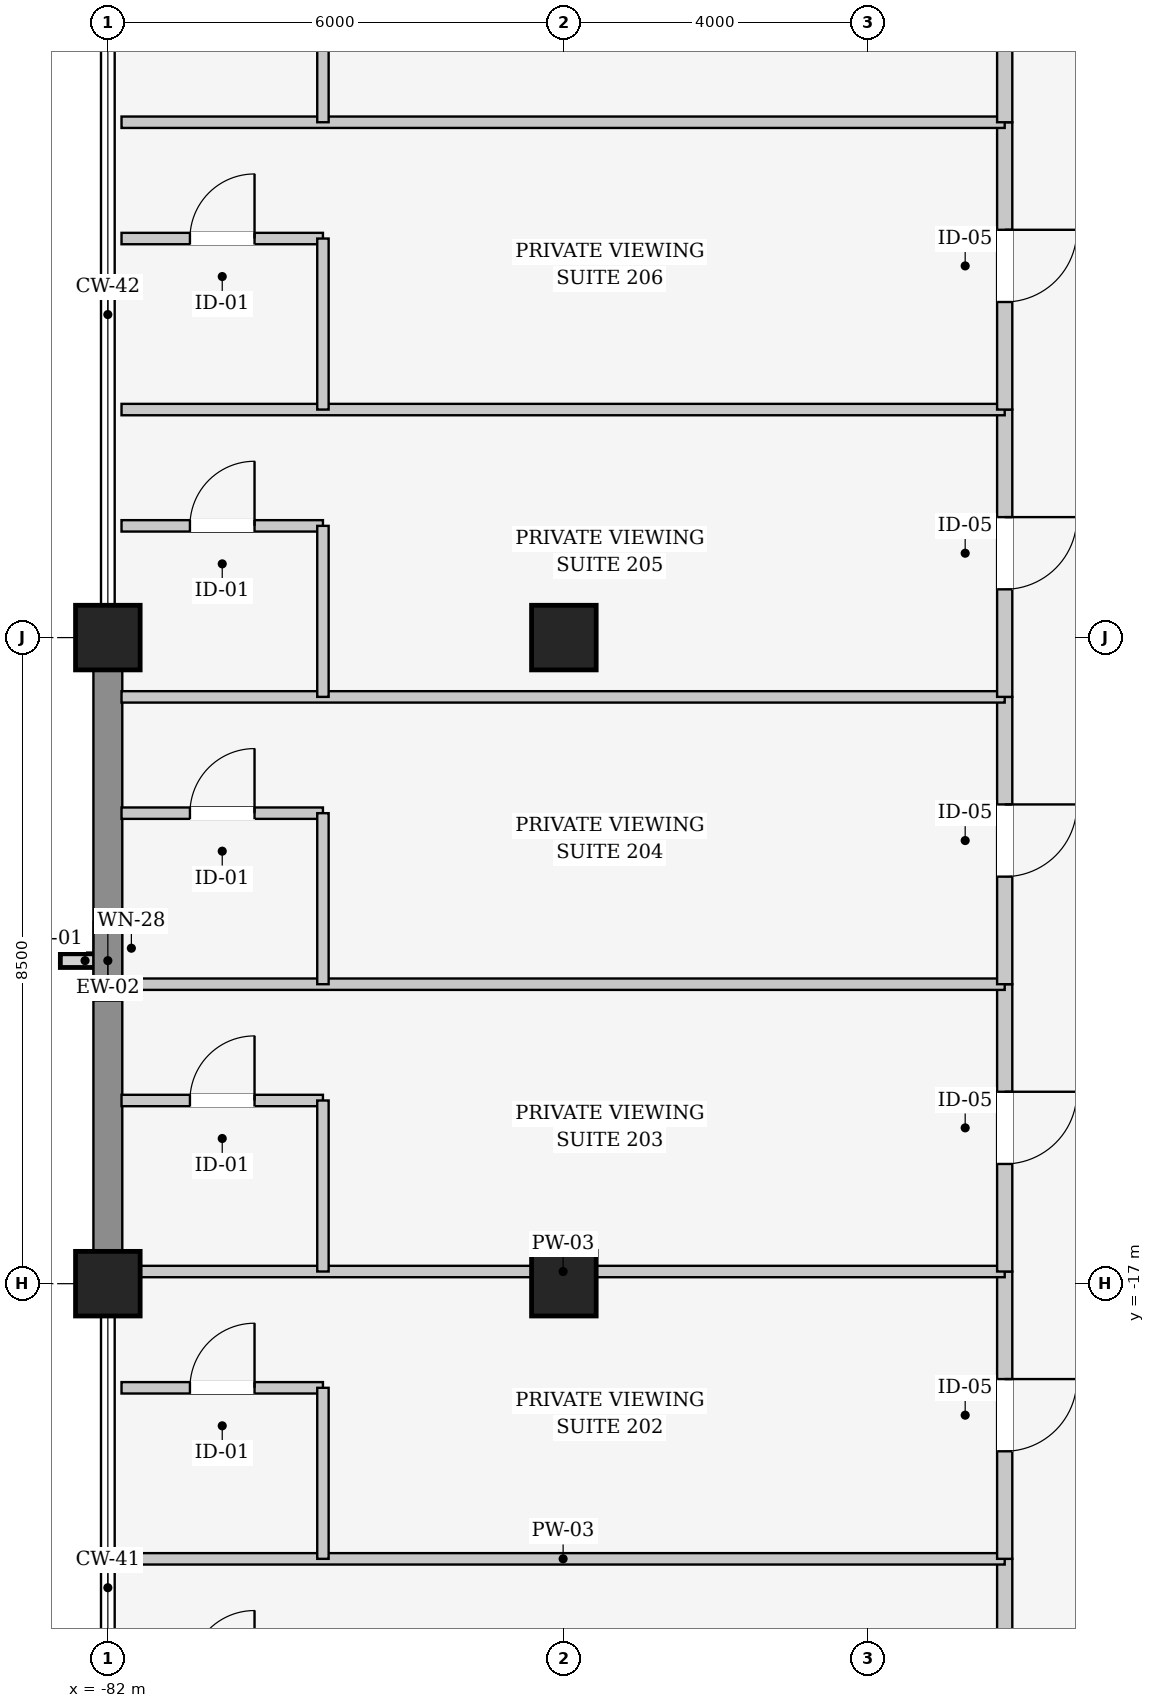
"""IFC4 building model, lengths in metres.
Left out: names, types, materials, properties, quantities, classifications, styles, units other than length and angle.
Written with IfcOpenShell. Run it as: python <this file> out.ifc"""

import sys

from ifc_helpers import new_model, si_unit, direction, frame, frame_2d, origin, origin_2d, place, context, subcontext, project, spatial, rectangle, extrude, element, fill, save


model = new_model("IFC4")
c1 = context("Model", 3, precision=1e-05, world=origin(), true_north=direction((0.0, 1.0)))
c2 = subcontext(c1, "Body", "Model", "MODEL_VIEW")
j1 = project(units=[si_unit("LENGTHUNIT", "METRE"), si_unit("PLANEANGLEUNIT", "RADIAN")], contexts=[c1])
p1 = place(None, origin())
s1 = spatial("IfcSite", under=j1, at=p1, CompositionType="ELEMENT")
p2 = place(p1, origin())
s2 = spatial("IfcBuilding", under=s1, at=p2, CompositionType="ELEMENT")
p3 = place(p2, frame((0.0, 0.0, 11.4)))
s3 = spatial("IfcBuildingStorey", under=s2, at=p3, CompositionType="ELEMENT", Elevation=11.4)
for number, where, z_axis, x_axis in (
    (1, (-82.0, -17.0, 0.0), (0.0, 0.0, 1.0), (1.0, 0.0, 0.0)),
    (2, (-82.0, -8.5, 0.0), (0.0, 0.0, 1.0), (1.0, 0.0, 0.0)),
    (3, (-76.0, -17.0, 0.0), (0.0, 0.0, 1.0), (1.0, 0.0, 0.0)),
    (4, (-76.0, -8.5, 0.0), (0.0, 0.0, 1.0), (1.0, 0.0, 0.0)),
):
    element("IfcColumn", number, at=place(p3, frame(where, z_axis=z_axis, x_axis=x_axis)), inside=s3, PredefinedType="COLUMN", context=c2, shape_type="SweptSolid", body=[
        extrude(rectangle(XDim=0.85, YDim=0.85, at=origin_2d()), origin(), (0.0, 0.0, 1.0), 4.8),
    ])
p4 = place(p3, frame((-82.0, -16.593, 0.0), z_axis=(0.0, 0.0, 1.0), x_axis=(0.0, 1.0, 0.0)))
e5 = element("IfcWall", 5, at=p4, inside=s3, PredefinedType="SOLIDWALL", context=c2, shape_type="SweptSolid", body=[
    extrude(rectangle(XDim=7.686, YDim=0.38, at=frame_2d((3.843, 0.0))), origin(), (0.0, 0.0, 1.0), 3.76),
])
p5 = place(p4, frame((3.318, 0.0, 0.9)))
e6 = element("IfcOpeningElement", 6, at=p5, cuts=e5, PredefinedType="OPENING", context=c2, shape_type="SweptSolid", body=[
    extrude(rectangle(XDim=1.05, YDim=2.0, at=frame_2d((0.525, 1.0))), frame((0.0, 0.2, 0.0), z_axis=(0.0, -1.0, 0.0), x_axis=(1.0, 0.0, 0.0)), (0.0, 0.0, 1.0), 0.4),
])
p6 = place(p3, frame((-70.2, -20.62, 0.0), z_axis=(0.0, 0.0, 1.0), x_axis=(0.0, -1.0, 0.0)))
e7 = element("IfcWall", 7, at=p6, inside=s3, PredefinedType="PARTITIONING", context=c2, shape_type="SweptSolid", body=[
    extrude(rectangle(XDim=3.78, YDim=0.2, at=frame_2d((1.89, 0.0))), origin(), (0.0, 0.0, 1.0), 4.14),
])
p7 = place(p6, frame((1.415, 0.0, 0.0)))
e8 = element("IfcOpeningElement", 8, at=p7, cuts=e7, PredefinedType="OPENING", context=c2, shape_type="SweptSolid", body=[
    extrude(rectangle(XDim=0.95, YDim=2.25, at=frame_2d((0.475, 1.125))), frame((0.0, 0.11, 0.0), z_axis=(0.0, -1.0, 0.0), x_axis=(1.0, 0.0, 0.0)), (0.0, 0.0, 1.0), 0.22),
])
p8 = place(p3, frame((-81.82, -20.62, 0.0), z_axis=(0.0, 0.0, 1.0), x_axis=(1.0, 0.0, 0.0)))
e9 = element("IfcWall", 9, at=p8, inside=s3, PredefinedType="PARTITIONING", context=c2, shape_type="SweptSolid", body=[
    extrude(rectangle(XDim=11.62, YDim=0.15, at=frame_2d((5.81, 0.0))), origin(), (0.0, 0.0, 1.0), 3.845),
])
p9 = place(p3, frame((-81.82, -18.37, 0.0), z_axis=(0.0, 0.0, 1.0), x_axis=(1.0, 0.0, 0.0)))
e10 = element("IfcWall", 10, at=p9, inside=s3, PredefinedType="PARTITIONING", context=c2, shape_type="SweptSolid", body=[
    extrude(rectangle(XDim=2.65, YDim=0.15, at=frame_2d((1.325, 0.0))), origin(), (0.0, 0.0, 1.0), 3.845),
])
p10 = place(p9, frame((0.9, 0.0, 0.0)))
e11 = element("IfcOpeningElement", 11, at=p10, cuts=e10, PredefinedType="OPENING", context=c2, shape_type="SweptSolid", body=[
    extrude(rectangle(XDim=0.85, YDim=2.15, at=frame_2d((0.425, 1.075))), frame((0.0, 0.085, 0.0), z_axis=(0.0, -1.0, 0.0), x_axis=(1.0, 0.0, 0.0)), (0.0, 0.0, 1.0), 0.17),
])
p11 = place(p3, frame((-79.17, -18.37, 0.0), z_axis=(0.0, 0.0, 1.0), x_axis=(0.0, -1.0, 0.0)))
e12 = element("IfcWall", 12, at=p11, inside=s3, PredefinedType="PARTITIONING", context=c2, shape_type="SweptSolid", body=[
    extrude(rectangle(XDim=2.25, YDim=0.15, at=frame_2d((1.125, 0.0))), origin(), (0.0, 0.0, 1.0), 4.44),
])
p12 = place(p3, frame((-70.2, -16.84, 0.0), z_axis=(0.0, 0.0, 1.0), x_axis=(0.0, -1.0, 0.0)))
e13 = element("IfcWall", 13, at=p12, inside=s3, PredefinedType="PARTITIONING", context=c2, shape_type="SweptSolid", body=[
    extrude(rectangle(XDim=3.78, YDim=0.2, at=frame_2d((1.89, 0.0))), origin(), (0.0, 0.0, 1.0), 3.545),
])
p13 = place(p12, frame((1.415, 0.0, 0.0)))
e14 = element("IfcOpeningElement", 14, at=p13, cuts=e13, PredefinedType="OPENING", context=c2, shape_type="SweptSolid", body=[
    extrude(rectangle(XDim=0.95, YDim=2.25, at=frame_2d((0.475, 1.125))), frame((0.0, 0.11, 0.0), z_axis=(0.0, -1.0, 0.0), x_axis=(1.0, 0.0, 0.0)), (0.0, 0.0, 1.0), 0.22),
])
p14 = place(p3, frame((-81.82, -16.84, 0.0), z_axis=(0.0, 0.0, 1.0), x_axis=(1.0, 0.0, 0.0)))
e15 = element("IfcWall", 15, at=p14, inside=s3, PredefinedType="PARTITIONING", context=c2, shape_type="SweptSolid", body=[
    extrude(rectangle(XDim=11.62, YDim=0.15, at=frame_2d((5.81, 0.0))), origin(), (0.0, 0.0, 1.0), 3.545),
])
p15 = place(p3, frame((-81.82, -14.59, 0.0), z_axis=(0.0, 0.0, 1.0), x_axis=(1.0, 0.0, 0.0)))
e16 = element("IfcWall", 16, at=p15, inside=s3, PredefinedType="PARTITIONING", context=c2, shape_type="SweptSolid", body=[
    extrude(rectangle(XDim=2.65, YDim=0.15, at=frame_2d((1.325, 0.0))), origin(), (0.0, 0.0, 1.0), 3.845),
])
p16 = place(p15, frame((0.9, 0.0, 0.0)))
e17 = element("IfcOpeningElement", 17, at=p16, cuts=e16, PredefinedType="OPENING", context=c2, shape_type="SweptSolid", body=[
    extrude(rectangle(XDim=0.85, YDim=2.15, at=frame_2d((0.425, 1.075))), frame((0.0, 0.085, 0.0), z_axis=(0.0, -1.0, 0.0), x_axis=(1.0, 0.0, 0.0)), (0.0, 0.0, 1.0), 0.17),
])
p17 = place(p3, frame((-79.17, -14.59, 0.0), z_axis=(0.0, 0.0, 1.0), x_axis=(0.0, -1.0, 0.0)))
e18 = element("IfcWall", 18, at=p17, inside=s3, PredefinedType="PARTITIONING", context=c2, shape_type="SweptSolid", body=[
    extrude(rectangle(XDim=2.25, YDim=0.15, at=frame_2d((1.125, 0.0))), origin(), (0.0, 0.0, 1.0), 3.745),
])
p18 = place(p3, frame((-70.2, -13.06, 0.0), z_axis=(0.0, 0.0, 1.0), x_axis=(0.0, -1.0, 0.0)))
e19 = element("IfcWall", 19, at=p18, inside=s3, PredefinedType="PARTITIONING", context=c2, shape_type="SweptSolid", body=[
    extrude(rectangle(XDim=3.78, YDim=0.2, at=frame_2d((1.89, 0.0))), origin(), (0.0, 0.0, 1.0), 3.545),
])
p19 = place(p18, frame((1.415, 0.0, 0.0)))
e20 = element("IfcOpeningElement", 20, at=p19, cuts=e19, PredefinedType="OPENING", context=c2, shape_type="SweptSolid", body=[
    extrude(rectangle(XDim=0.95, YDim=2.25, at=frame_2d((0.475, 1.125))), frame((0.0, 0.11, 0.0), z_axis=(0.0, -1.0, 0.0), x_axis=(1.0, 0.0, 0.0)), (0.0, 0.0, 1.0), 0.22),
])
p20 = place(p3, frame((-81.82, -13.06, 0.0), z_axis=(0.0, 0.0, 1.0), x_axis=(1.0, 0.0, 0.0)))
e21 = element("IfcWall", 21, at=p20, inside=s3, PredefinedType="PARTITIONING", context=c2, shape_type="SweptSolid", body=[
    extrude(rectangle(XDim=11.62, YDim=0.15, at=frame_2d((5.81, 0.0))), origin(), (0.0, 0.0, 1.0), 3.845),
])
p21 = place(p3, frame((-81.82, -10.81, 0.0), z_axis=(0.0, 0.0, 1.0), x_axis=(1.0, 0.0, 0.0)))
e22 = element("IfcWall", 22, at=p21, inside=s3, PredefinedType="PARTITIONING", context=c2, shape_type="SweptSolid", body=[
    extrude(rectangle(XDim=2.65, YDim=0.15, at=frame_2d((1.325, 0.0))), origin(), (0.0, 0.0, 1.0), 3.845),
])
p22 = place(p21, frame((0.9, 0.0, 0.0)))
e23 = element("IfcOpeningElement", 23, at=p22, cuts=e22, PredefinedType="OPENING", context=c2, shape_type="SweptSolid", body=[
    extrude(rectangle(XDim=0.85, YDim=2.15, at=frame_2d((0.425, 1.075))), frame((0.0, 0.085, 0.0), z_axis=(0.0, -1.0, 0.0), x_axis=(1.0, 0.0, 0.0)), (0.0, 0.0, 1.0), 0.17),
])
p23 = place(p3, frame((-79.17, -10.81, 0.0), z_axis=(0.0, 0.0, 1.0), x_axis=(0.0, -1.0, 0.0)))
e24 = element("IfcWall", 24, at=p23, inside=s3, PredefinedType="PARTITIONING", context=c2, shape_type="SweptSolid", body=[
    extrude(rectangle(XDim=2.25, YDim=0.15, at=frame_2d((1.125, 0.0))), origin(), (0.0, 0.0, 1.0), 4.14),
])
p24 = place(p3, frame((-70.2, -9.28, 0.0), z_axis=(0.0, 0.0, 1.0), x_axis=(0.0, -1.0, 0.0)))
e25 = element("IfcWall", 25, at=p24, inside=s3, PredefinedType="PARTITIONING", context=c2, shape_type="SweptSolid", body=[
    extrude(rectangle(XDim=3.78, YDim=0.2, at=frame_2d((1.89, 0.0))), origin(), (0.0, 0.0, 1.0), 4.14),
])
p25 = place(p24, frame((1.415, 0.0, 0.0)))
e26 = element("IfcOpeningElement", 26, at=p25, cuts=e25, PredefinedType="OPENING", context=c2, shape_type="SweptSolid", body=[
    extrude(rectangle(XDim=0.95, YDim=2.25, at=frame_2d((0.475, 1.125))), frame((0.0, 0.11, 0.0), z_axis=(0.0, -1.0, 0.0), x_axis=(1.0, 0.0, 0.0)), (0.0, 0.0, 1.0), 0.22),
])
p26 = place(p3, frame((-81.82, -9.28, 0.0), z_axis=(0.0, 0.0, 1.0), x_axis=(1.0, 0.0, 0.0)))
e27 = element("IfcWall", 27, at=p26, inside=s3, PredefinedType="PARTITIONING", context=c2, shape_type="SweptSolid", body=[
    extrude(rectangle(XDim=11.62, YDim=0.15, at=frame_2d((5.81, 0.0))), origin(), (0.0, 0.0, 1.0), 3.845),
])
p27 = place(p3, frame((-81.82, -7.03, 0.0), z_axis=(0.0, 0.0, 1.0), x_axis=(1.0, 0.0, 0.0)))
e28 = element("IfcWall", 28, at=p27, inside=s3, PredefinedType="PARTITIONING", context=c2, shape_type="SweptSolid", body=[
    extrude(rectangle(XDim=2.65, YDim=0.15, at=frame_2d((1.325, 0.0))), origin(), (0.0, 0.0, 1.0), 3.845),
])
p28 = place(p27, frame((0.9, 0.0, 0.0)))
e29 = element("IfcOpeningElement", 29, at=p28, cuts=e28, PredefinedType="OPENING", context=c2, shape_type="SweptSolid", body=[
    extrude(rectangle(XDim=0.85, YDim=2.15, at=frame_2d((0.425, 1.075))), frame((0.0, 0.085, 0.0), z_axis=(0.0, -1.0, 0.0), x_axis=(1.0, 0.0, 0.0)), (0.0, 0.0, 1.0), 0.17),
])
p29 = place(p3, frame((-79.17, -7.03, 0.0), z_axis=(0.0, 0.0, 1.0), x_axis=(0.0, -1.0, 0.0)))
e30 = element("IfcWall", 30, at=p29, inside=s3, PredefinedType="PARTITIONING", context=c2, shape_type="SweptSolid", body=[
    extrude(rectangle(XDim=2.25, YDim=0.15, at=frame_2d((1.125, 0.0))), origin(), (0.0, 0.0, 1.0), 3.745),
])
p30 = place(p3, frame((-70.2, -5.5, 0.0), z_axis=(0.0, 0.0, 1.0), x_axis=(0.0, -1.0, 0.0)))
e31 = element("IfcWall", 31, at=p30, inside=s3, PredefinedType="PARTITIONING", context=c2, shape_type="SweptSolid", body=[
    extrude(rectangle(XDim=3.78, YDim=0.2, at=frame_2d((1.89, 0.0))), origin(), (0.0, 0.0, 1.0), 3.545),
])
p31 = place(p30, frame((1.415, 0.0, 0.0)))
e32 = element("IfcOpeningElement", 32, at=p31, cuts=e31, PredefinedType="OPENING", context=c2, shape_type="SweptSolid", body=[
    extrude(rectangle(XDim=0.95, YDim=2.25, at=frame_2d((0.475, 1.125))), frame((0.0, 0.11, 0.0), z_axis=(0.0, -1.0, 0.0), x_axis=(1.0, 0.0, 0.0)), (0.0, 0.0, 1.0), 0.22),
])
p32 = place(p3, frame((-81.82, -5.5, 0.0), z_axis=(0.0, 0.0, 1.0), x_axis=(1.0, 0.0, 0.0)))
e33 = element("IfcWall", 33, at=p32, inside=s3, PredefinedType="PARTITIONING", context=c2, shape_type="SweptSolid", body=[
    extrude(rectangle(XDim=11.62, YDim=0.15, at=frame_2d((5.81, 0.0))), origin(), (0.0, 0.0, 1.0), 3.845),
])
p33 = place(p3, frame((-81.82, -3.25, 0.0), z_axis=(0.0, 0.0, 1.0), x_axis=(1.0, 0.0, 0.0)))
e34 = element("IfcWall", 34, at=p33, inside=s3, PredefinedType="PARTITIONING", context=c2, shape_type="SweptSolid", body=[
    extrude(rectangle(XDim=2.65, YDim=0.15, at=frame_2d((1.325, 0.0))), origin(), (0.0, 0.0, 1.0), 3.845),
])
p34 = place(p33, frame((0.9, 0.0, 0.0)))
e35 = element("IfcOpeningElement", 35, at=p34, cuts=e34, PredefinedType="OPENING", context=c2, shape_type="SweptSolid", body=[
    extrude(rectangle(XDim=0.85, YDim=2.15, at=frame_2d((0.425, 1.075))), frame((0.0, 0.085, 0.0), z_axis=(0.0, -1.0, 0.0), x_axis=(1.0, 0.0, 0.0)), (0.0, 0.0, 1.0), 0.17),
])
p35 = place(p3, frame((-79.17, -3.25, 0.0), z_axis=(0.0, 0.0, 1.0), x_axis=(0.0, -1.0, 0.0)))
e36 = element("IfcWall", 36, at=p35, inside=s3, PredefinedType="PARTITIONING", context=c2, shape_type="SweptSolid", body=[
    extrude(rectangle(XDim=2.25, YDim=0.15, at=frame_2d((1.125, 0.0))), origin(), (0.0, 0.0, 1.0), 4.14),
])
p36 = place(p3, frame((-70.2, -1.72, 0.0), z_axis=(0.0, 0.0, 1.0), x_axis=(0.0, -1.0, 0.0)))
e37 = element("IfcWall", 37, at=p36, inside=s3, PredefinedType="PARTITIONING", context=c2, shape_type="SweptSolid", body=[
    extrude(rectangle(XDim=3.78, YDim=0.2, at=frame_2d((1.89, 0.0))), origin(), (0.0, 0.0, 1.0), 4.14),
])
p37 = place(p36, frame((1.415, 0.0, 0.0)))
e38 = element("IfcOpeningElement", 38, at=p37, cuts=e37, PredefinedType="OPENING", context=c2, shape_type="SweptSolid", body=[
    extrude(rectangle(XDim=0.95, YDim=2.25, at=frame_2d((0.475, 1.125))), frame((0.0, 0.11, 0.0), z_axis=(0.0, -1.0, 0.0), x_axis=(1.0, 0.0, 0.0)), (0.0, 0.0, 1.0), 0.22),
])
p38 = place(p3, frame((-81.82, -1.72, 0.0), z_axis=(0.0, 0.0, 1.0), x_axis=(1.0, 0.0, 0.0)))
e39 = element("IfcWall", 39, at=p38, inside=s3, PredefinedType="PARTITIONING", context=c2, shape_type="SweptSolid", body=[
    extrude(rectangle(XDim=11.62, YDim=0.15, at=frame_2d((5.81, 0.0))), origin(), (0.0, 0.0, 1.0), 3.845),
])
p39 = place(p3, frame((-79.17, 0.53, 0.0), z_axis=(0.0, 0.0, 1.0), x_axis=(0.0, -1.0, 0.0)))
e40 = element("IfcWall", 40, at=p39, inside=s3, PredefinedType="PARTITIONING", context=c2, shape_type="SweptSolid", body=[
    extrude(rectangle(XDim=2.25, YDim=0.15, at=frame_2d((1.125, 0.0))), origin(), (0.0, 0.0, 1.0), 3.745),
])
p40 = place(p3, frame((-70.2, 2.06, 0.0), z_axis=(0.0, 0.0, 1.0), x_axis=(0.0, -1.0, 0.0)))
e41 = element("IfcWall", 41, at=p40, inside=s3, PredefinedType="PARTITIONING", context=c2, shape_type="SweptSolid", body=[
    extrude(rectangle(XDim=3.78, YDim=0.2, at=frame_2d((1.89, 0.0))), origin(), (0.0, 0.0, 1.0), 3.545),
])
p41 = place(p40, frame((1.415, 0.0, 0.0)))
e42 = element("IfcOpeningElement", 42, at=p41, cuts=e41, PredefinedType="OPENING", context=c2, shape_type="SweptSolid", body=[
    extrude(rectangle(XDim=0.95, YDim=2.25, at=frame_2d((0.475, 1.125))), frame((0.0, 0.11, 0.0), z_axis=(0.0, -1.0, 0.0), x_axis=(1.0, 0.0, 0.0)), (0.0, 0.0, 1.0), 0.22),
])
p42 = place(p5, origin())
e43 = element("IfcWindow", 43, at=p42, inside=s3, PartitioningType="SINGLE_PANEL", PredefinedType="WINDOW", context=c2, shape_type="SweptSolid", body=[
    extrude(rectangle(XDim=1.05, YDim=2.0, at=frame_2d((0.525, 1.0))), frame((0.0, 0.03, 0.0), z_axis=(0.0, -1.0, 0.0), x_axis=(1.0, 0.0, 0.0)), (0.0, 0.0, 1.0), 0.06),
])
fill(e6, e43)
p43 = place(p10, origin())
e44 = element("IfcDoor", 44, at=p43, inside=s3, OperationType="SINGLE_SWING_RIGHT", PredefinedType="DOOR", context=c2, shape_type="SweptSolid", body=[
    extrude(rectangle(XDim=0.85, YDim=2.15, at=frame_2d((0.425, 1.075))), frame((0.0, 0.025, 0.0), z_axis=(0.0, -1.0, 0.0), x_axis=(1.0, 0.0, 0.0)), (0.0, 0.0, 1.0), 0.05),
])
fill(e11, e44)
p44 = place(p13, origin())
e45 = element("IfcDoor", 45, at=p44, inside=s3, OperationType="SINGLE_SWING_LEFT", PredefinedType="DOOR", context=c2, shape_type="SweptSolid", body=[
    extrude(rectangle(XDim=0.95, YDim=2.25, at=frame_2d((0.475, 1.125))), frame((0.0, 0.025, 0.0), z_axis=(0.0, -1.0, 0.0), x_axis=(1.0, 0.0, 0.0)), (0.0, 0.0, 1.0), 0.05),
])
fill(e14, e45)
p45 = place(p16, origin())
e46 = element("IfcDoor", 46, at=p45, inside=s3, OperationType="SINGLE_SWING_RIGHT", PredefinedType="DOOR", context=c2, shape_type="SweptSolid", body=[
    extrude(rectangle(XDim=0.85, YDim=2.15, at=frame_2d((0.425, 1.075))), frame((0.0, 0.025, 0.0), z_axis=(0.0, -1.0, 0.0), x_axis=(1.0, 0.0, 0.0)), (0.0, 0.0, 1.0), 0.05),
])
fill(e17, e46)
p46 = place(p19, origin())
e47 = element("IfcDoor", 47, at=p46, inside=s3, OperationType="SINGLE_SWING_LEFT", PredefinedType="DOOR", context=c2, shape_type="SweptSolid", body=[
    extrude(rectangle(XDim=0.95, YDim=2.25, at=frame_2d((0.475, 1.125))), frame((0.0, 0.025, 0.0), z_axis=(0.0, -1.0, 0.0), x_axis=(1.0, 0.0, 0.0)), (0.0, 0.0, 1.0), 0.05),
])
fill(e20, e47)
p47 = place(p22, origin())
e48 = element("IfcDoor", 48, at=p47, inside=s3, OperationType="SINGLE_SWING_RIGHT", PredefinedType="DOOR", context=c2, shape_type="SweptSolid", body=[
    extrude(rectangle(XDim=0.85, YDim=2.15, at=frame_2d((0.425, 1.075))), frame((0.0, 0.025, 0.0), z_axis=(0.0, -1.0, 0.0), x_axis=(1.0, 0.0, 0.0)), (0.0, 0.0, 1.0), 0.05),
])
fill(e23, e48)
p48 = place(p25, origin())
e49 = element("IfcDoor", 49, at=p48, inside=s3, OperationType="SINGLE_SWING_LEFT", PredefinedType="DOOR", context=c2, shape_type="SweptSolid", body=[
    extrude(rectangle(XDim=0.95, YDim=2.25, at=frame_2d((0.475, 1.125))), frame((0.0, 0.025, 0.0), z_axis=(0.0, -1.0, 0.0), x_axis=(1.0, 0.0, 0.0)), (0.0, 0.0, 1.0), 0.05),
])
fill(e26, e49)
p49 = place(p28, origin())
e50 = element("IfcDoor", 50, at=p49, inside=s3, OperationType="SINGLE_SWING_RIGHT", PredefinedType="DOOR", context=c2, shape_type="SweptSolid", body=[
    extrude(rectangle(XDim=0.85, YDim=2.15, at=frame_2d((0.425, 1.075))), frame((0.0, 0.025, 0.0), z_axis=(0.0, -1.0, 0.0), x_axis=(1.0, 0.0, 0.0)), (0.0, 0.0, 1.0), 0.05),
])
fill(e29, e50)
p50 = place(p31, origin())
e51 = element("IfcDoor", 51, at=p50, inside=s3, OperationType="SINGLE_SWING_LEFT", PredefinedType="DOOR", context=c2, shape_type="SweptSolid", body=[
    extrude(rectangle(XDim=0.95, YDim=2.25, at=frame_2d((0.475, 1.125))), frame((0.0, 0.025, 0.0), z_axis=(0.0, -1.0, 0.0), x_axis=(1.0, 0.0, 0.0)), (0.0, 0.0, 1.0), 0.05),
])
fill(e32, e51)
p51 = place(p34, origin())
e52 = element("IfcDoor", 52, at=p51, inside=s3, OperationType="SINGLE_SWING_RIGHT", PredefinedType="DOOR", context=c2, shape_type="SweptSolid", body=[
    extrude(rectangle(XDim=0.85, YDim=2.15, at=frame_2d((0.425, 1.075))), frame((0.0, 0.025, 0.0), z_axis=(0.0, -1.0, 0.0), x_axis=(1.0, 0.0, 0.0)), (0.0, 0.0, 1.0), 0.05),
])
fill(e35, e52)
p52 = place(p37, origin())
e53 = element("IfcDoor", 53, at=p52, inside=s3, OperationType="SINGLE_SWING_LEFT", PredefinedType="DOOR", context=c2, shape_type="SweptSolid", body=[
    extrude(rectangle(XDim=0.95, YDim=2.25, at=frame_2d((0.475, 1.125))), frame((0.0, 0.025, 0.0), z_axis=(0.0, -1.0, 0.0), x_axis=(1.0, 0.0, 0.0)), (0.0, 0.0, 1.0), 0.05),
])
fill(e38, e53)
save(model, sys.argv[1])
